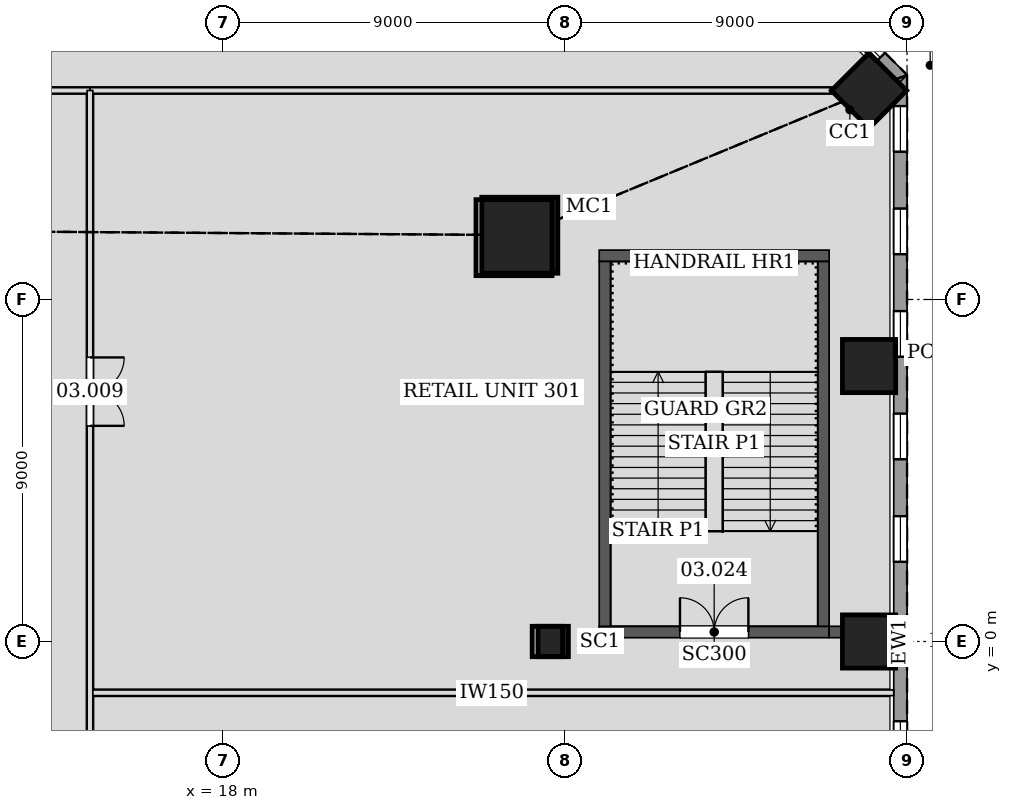
"""IFC4 building model, lengths in metres.
Left out: names, types, materials, properties, quantities, classifications, styles, units other than length and angle.
Written with IfcOpenShell. Run it as: python <this file> out.ifc"""

import sys

from ifc_helpers import new_model, si_unit, direction, frame, frame_2d, origin, origin_2d, place, context, subcontext, project, spatial, rectangle, hollow_rectangle, extrude, element, fill, save


model = new_model("IFC4")
c1 = context("Model", 3, precision=1e-05, world=origin(), true_north=direction((0.0, 1.0)))
c2 = subcontext(c1, "Body", "Model", "MODEL_VIEW")
j1 = project(units=[si_unit("LENGTHUNIT", "METRE"), si_unit("PLANEANGLEUNIT", "RADIAN")], contexts=[c1])
p1 = place(None, origin())
s1 = spatial("IfcSite", under=j1, at=p1, CompositionType="ELEMENT")
p2 = place(p1, origin())
s2 = spatial("IfcBuilding", under=s1, at=p2, CompositionType="ELEMENT")
p3 = place(p2, frame((0.0, 0.0, 18.6)))
s3 = spatial("IfcBuildingStorey", under=s2, at=p3, CompositionType="ELEMENT", Elevation=18.6)
p4 = place(p3, frame((25.81, 10.691, 0.0), z_axis=(-0.028289472832, -0.011704430453, 0.999531246152), x_axis=(0.3823083337, -0.92403481427, 0.0)))
e1 = element("IfcColumn", 1, at=p4, inside=s3, PredefinedType="COLUMN", context=c2, shape_type="SweptSolid", body=[
    extrude(hollow_rectangle(XDim=2.0, YDim=2.0, WallThickness=0.09, at=origin_2d()), origin(), (0.0, 0.0, 1.0), 5.402),
])
p5 = place(p3, frame((26.688, 0.0, 0.0), z_axis=(-0.02824625291, 0.0, 0.999600994996), x_axis=(0.0, -1.0, 0.0)))
e2 = element("IfcColumn", 2, at=p5, inside=s3, PredefinedType="COLUMN", context=c2, shape_type="SweptSolid", body=[
    extrude(hollow_rectangle(XDim=0.8, YDim=0.8, WallThickness=0.05, at=origin_2d()), origin(), (0.0, 0.0, 1.0), 5.402),
])
for number, where, z_axis, x_axis in (
    (3, (35.0, 0.0, 0.0), (0.0, 0.0, 1.0), (1.0, 0.0, 0.0)),
    (4, (35.0, 7.249, 0.0), (0.0, 0.0, 1.0), (1.0, 0.0, 0.0)),
    (5, (35.0, 14.498, 0.0), (0.0, 0.0, 1.0), (0.707, 0.707, 0.0)),
):
    element("IfcColumn", number, at=place(p3, frame(where, z_axis=z_axis, x_axis=x_axis)), inside=s3, PredefinedType="COLUMN", context=c2, shape_type="SweptSolid", body=[
        extrude(rectangle(XDim=1.4, YDim=1.4, at=origin_2d()), origin(), (0.0, 0.0, 1.0), 5.4),
    ])
p6 = place(p3, frame((27.9, 0.25, 0.0), z_axis=(0.0, 0.0, 1.0), x_axis=(1.0, 0.0, 0.0)))
e6 = element("IfcWall", 6, at=p6, inside=s3, PredefinedType="SOLIDWALL", context=c2, shape_type="SweptSolid", body=[
    extrude(rectangle(XDim=6.05, YDim=0.3, at=frame_2d((3.025, 0.0))), origin(), (0.0, 0.0, 1.0), 5.4),
])
p7 = place(p6, frame((2.125, 0.0, 0.0)))
e7 = element("IfcOpeningElement", 7, at=p7, cuts=e6, PredefinedType="OPENING", context=c2, shape_type="SweptSolid", body=[
    extrude(rectangle(XDim=1.8, YDim=2.1, at=frame_2d((0.9, 1.05))), frame((0.0, 0.16, 0.0), z_axis=(0.0, -1.0, 0.0), x_axis=(1.0, 0.0, 0.0)), (0.0, 0.0, 1.0), 0.32),
])
p8 = place(p3, frame((33.95, 0.25, 0.0), z_axis=(0.0, 0.0, 1.0), x_axis=(1.0, 0.0, 0.0)))
e8 = element("IfcWall", 8, at=p8, inside=s3, PredefinedType="SOLIDWALL", context=c2, shape_type="SweptSolid", body=[
    extrude(rectangle(XDim=0.35, YDim=0.3, at=frame_2d((0.175, 0.0))), origin(), (0.0, 0.0, 1.0), 4.744),
])
p9 = place(p3, frame((33.95, 10.15, 0.0), z_axis=(0.0, 0.0, 1.0), x_axis=(-1.0, 0.0, 0.0)))
e9 = element("IfcWall", 9, at=p9, inside=s3, PredefinedType="SOLIDWALL", context=c2, shape_type="SweptSolid", body=[
    extrude(rectangle(XDim=6.05, YDim=0.3, at=frame_2d((3.025, 0.0))), origin(), (0.0, 0.0, 1.0), 5.4),
])
for number, where, z_axis, x_axis in (
    (10, (28.05, 10.0, 0.0), (0.0, 0.0, 1.0), (0.0, -1.0, 0.0)),
    (11, (33.8, 0.4, 0.0), (0.0, 0.0, 1.0), (0.0, 1.0, 0.0)),
):
    element("IfcWall", number, at=place(p3, frame(where, z_axis=z_axis, x_axis=x_axis)), inside=s3, PredefinedType="SOLIDWALL", context=c2, shape_type="SweptSolid", body=[
        extrude(rectangle(XDim=9.6, YDim=0.3, at=frame_2d((4.8, 0.0))), origin(), (0.0, 0.0, 1.0), 5.4),
    ])
p10 = place(p3, frame((35.825, -14.912, 0.0), z_axis=(0.0, 0.0, 1.0), x_axis=(0.0, 1.0, 0.0)))
e12 = element("IfcWall", 12, at=p10, inside=s3, PredefinedType="SOLIDWALL", context=c2, shape_type="SweptSolid", body=[
    extrude(rectangle(XDim=29.823, YDim=0.35, at=frame_2d((14.912, 0.0))), origin(), (0.0, 0.0, 1.0), 5.1),
])
p11 = place(p10, frame((0.822, 0.0, 0.9)))
e13 = element("IfcOpeningElement", 13, at=p11, cuts=e12, PredefinedType="OPENING", context=c2, shape_type="SweptSolid", body=[
    extrude(rectangle(XDim=1.2, YDim=3.6, at=frame_2d((0.6, 1.8))), frame((0.0, 0.185, 0.0), z_axis=(0.0, -1.0, 0.0), x_axis=(1.0, 0.0, 0.0)), (0.0, 0.0, 1.0), 0.37),
])
p12 = place(p10, frame((3.52, 0.0, 0.9)))
e14 = element("IfcOpeningElement", 14, at=p12, cuts=e12, PredefinedType="OPENING", context=c2, shape_type="SweptSolid", body=[
    extrude(rectangle(XDim=1.2, YDim=3.6, at=frame_2d((0.6, 1.8))), frame((0.0, 0.185, 0.0), z_axis=(0.0, -1.0, 0.0), x_axis=(1.0, 0.0, 0.0)), (0.0, 0.0, 1.0), 0.37),
])
p13 = place(p10, frame((6.218, 0.0, 0.9)))
e15 = element("IfcOpeningElement", 15, at=p13, cuts=e12, PredefinedType="OPENING", context=c2, shape_type="SweptSolid", body=[
    extrude(rectangle(XDim=1.2, YDim=3.6, at=frame_2d((0.6, 1.8))), frame((0.0, 0.185, 0.0), z_axis=(0.0, -1.0, 0.0), x_axis=(1.0, 0.0, 0.0)), (0.0, 0.0, 1.0), 0.37),
])
p14 = place(p10, frame((8.916, 0.0, 0.9)))
e16 = element("IfcOpeningElement", 16, at=p14, cuts=e12, PredefinedType="OPENING", context=c2, shape_type="SweptSolid", body=[
    extrude(rectangle(XDim=1.2, YDim=3.6, at=frame_2d((0.6, 1.8))), frame((0.0, 0.185, 0.0), z_axis=(0.0, -1.0, 0.0), x_axis=(1.0, 0.0, 0.0)), (0.0, 0.0, 1.0), 0.37),
])
p15 = place(p10, frame((11.614, 0.0, 0.9)))
e17 = element("IfcOpeningElement", 17, at=p15, cuts=e12, PredefinedType="OPENING", context=c2, shape_type="SweptSolid", body=[
    extrude(rectangle(XDim=1.2, YDim=3.6, at=frame_2d((0.6, 1.8))), frame((0.0, 0.185, 0.0), z_axis=(0.0, -1.0, 0.0), x_axis=(1.0, 0.0, 0.0)), (0.0, 0.0, 1.0), 0.37),
])
p16 = place(p10, frame((14.312, 0.0, 0.9)))
e18 = element("IfcOpeningElement", 18, at=p16, cuts=e12, PredefinedType="OPENING", context=c2, shape_type="SweptSolid", body=[
    extrude(rectangle(XDim=1.2, YDim=3.6, at=frame_2d((0.6, 1.8))), frame((0.0, 0.185, 0.0), z_axis=(0.0, -1.0, 0.0), x_axis=(1.0, 0.0, 0.0)), (0.0, 0.0, 1.0), 0.37),
])
p17 = place(p10, frame((17.01, 0.0, 0.9)))
e19 = element("IfcOpeningElement", 19, at=p17, cuts=e12, PredefinedType="OPENING", context=c2, shape_type="SweptSolid", body=[
    extrude(rectangle(XDim=1.2, YDim=3.6, at=frame_2d((0.6, 1.8))), frame((0.0, 0.185, 0.0), z_axis=(0.0, -1.0, 0.0), x_axis=(1.0, 0.0, 0.0)), (0.0, 0.0, 1.0), 0.37),
])
p18 = place(p10, frame((19.708, 0.0, 0.9)))
e20 = element("IfcOpeningElement", 20, at=p18, cuts=e12, PredefinedType="OPENING", context=c2, shape_type="SweptSolid", body=[
    extrude(rectangle(XDim=1.2, YDim=3.6, at=frame_2d((0.6, 1.8))), frame((0.0, 0.185, 0.0), z_axis=(0.0, -1.0, 0.0), x_axis=(1.0, 0.0, 0.0)), (0.0, 0.0, 1.0), 0.37),
])
p19 = place(p10, frame((22.406, 0.0, 0.9)))
e21 = element("IfcOpeningElement", 21, at=p19, cuts=e12, PredefinedType="OPENING", context=c2, shape_type="SweptSolid", body=[
    extrude(rectangle(XDim=1.2, YDim=3.6, at=frame_2d((0.6, 1.8))), frame((0.0, 0.185, 0.0), z_axis=(0.0, -1.0, 0.0), x_axis=(1.0, 0.0, 0.0)), (0.0, 0.0, 1.0), 0.37),
])
p20 = place(p10, frame((25.104, 0.0, 0.9)))
e22 = element("IfcOpeningElement", 22, at=p20, cuts=e12, PredefinedType="OPENING", context=c2, shape_type="SweptSolid", body=[
    extrude(rectangle(XDim=1.2, YDim=3.6, at=frame_2d((0.6, 1.8))), frame((0.0, 0.185, 0.0), z_axis=(0.0, -1.0, 0.0), x_axis=(1.0, 0.0, 0.0)), (0.0, 0.0, 1.0), 0.37),
])
p21 = place(p10, frame((27.802, 0.0, 0.9)))
e23 = element("IfcOpeningElement", 23, at=p21, cuts=e12, PredefinedType="OPENING", context=c2, shape_type="SweptSolid", body=[
    extrude(rectangle(XDim=1.2, YDim=3.6, at=frame_2d((0.6, 1.8))), frame((0.0, 0.185, 0.0), z_axis=(0.0, -1.0, 0.0), x_axis=(1.0, 0.0, 0.0)), (0.0, 0.0, 1.0), 0.37),
])
p22 = place(p3, frame((35.876, 14.788, 0.0), z_axis=(0.0, 0.0, 1.0), x_axis=(-0.707106781187, 0.707106781187, 0.0)))
e24 = element("IfcWall", 24, at=p22, inside=s3, PredefinedType="SOLIDWALL", context=c2, shape_type="SweptSolid", body=[
    extrude(rectangle(XDim=29.823, YDim=0.35, at=frame_2d((14.912, 0.0))), origin(), (0.0, 0.0, 1.0), 5.1),
])
p23 = place(p22, frame((0.822, 0.0, 0.9)))
e25 = element("IfcOpeningElement", 25, at=p23, cuts=e24, PredefinedType="OPENING", context=c2, shape_type="SweptSolid", body=[
    extrude(rectangle(XDim=1.2, YDim=3.6, at=frame_2d((0.6, 1.8))), frame((0.0, 0.185, 0.0), z_axis=(0.0, -1.0, 0.0), x_axis=(1.0, 0.0, 0.0)), (0.0, 0.0, 1.0), 0.37),
])
p24 = place(p22, frame((3.52, 0.0, 0.9)))
e26 = element("IfcOpeningElement", 26, at=p24, cuts=e24, PredefinedType="OPENING", context=c2, shape_type="SweptSolid", body=[
    extrude(rectangle(XDim=1.2, YDim=3.6, at=frame_2d((0.6, 1.8))), frame((0.0, 0.185, 0.0), z_axis=(0.0, -1.0, 0.0), x_axis=(1.0, 0.0, 0.0)), (0.0, 0.0, 1.0), 0.37),
])
p25 = place(p22, frame((6.218, 0.0, 0.9)))
e27 = element("IfcOpeningElement", 27, at=p25, cuts=e24, PredefinedType="OPENING", context=c2, shape_type="SweptSolid", body=[
    extrude(rectangle(XDim=1.2, YDim=3.6, at=frame_2d((0.6, 1.8))), frame((0.0, 0.185, 0.0), z_axis=(0.0, -1.0, 0.0), x_axis=(1.0, 0.0, 0.0)), (0.0, 0.0, 1.0), 0.37),
])
p26 = place(p22, frame((8.916, 0.0, 0.9)))
e28 = element("IfcOpeningElement", 28, at=p26, cuts=e24, PredefinedType="OPENING", context=c2, shape_type="SweptSolid", body=[
    extrude(rectangle(XDim=1.2, YDim=3.6, at=frame_2d((0.6, 1.8))), frame((0.0, 0.185, 0.0), z_axis=(0.0, -1.0, 0.0), x_axis=(1.0, 0.0, 0.0)), (0.0, 0.0, 1.0), 0.37),
])
p27 = place(p22, frame((11.614, 0.0, 0.9)))
e29 = element("IfcOpeningElement", 29, at=p27, cuts=e24, PredefinedType="OPENING", context=c2, shape_type="SweptSolid", body=[
    extrude(rectangle(XDim=1.2, YDim=3.6, at=frame_2d((0.6, 1.8))), frame((0.0, 0.185, 0.0), z_axis=(0.0, -1.0, 0.0), x_axis=(1.0, 0.0, 0.0)), (0.0, 0.0, 1.0), 0.37),
])
p28 = place(p22, frame((14.312, 0.0, 0.9)))
e30 = element("IfcOpeningElement", 30, at=p28, cuts=e24, PredefinedType="OPENING", context=c2, shape_type="SweptSolid", body=[
    extrude(rectangle(XDim=1.2, YDim=3.6, at=frame_2d((0.6, 1.8))), frame((0.0, 0.185, 0.0), z_axis=(0.0, -1.0, 0.0), x_axis=(1.0, 0.0, 0.0)), (0.0, 0.0, 1.0), 0.37),
])
p29 = place(p22, frame((17.01, 0.0, 0.9)))
e31 = element("IfcOpeningElement", 31, at=p29, cuts=e24, PredefinedType="OPENING", context=c2, shape_type="SweptSolid", body=[
    extrude(rectangle(XDim=1.2, YDim=3.6, at=frame_2d((0.6, 1.8))), frame((0.0, 0.185, 0.0), z_axis=(0.0, -1.0, 0.0), x_axis=(1.0, 0.0, 0.0)), (0.0, 0.0, 1.0), 0.37),
])
p30 = place(p22, frame((19.708, 0.0, 0.9)))
e32 = element("IfcOpeningElement", 32, at=p30, cuts=e24, PredefinedType="OPENING", context=c2, shape_type="SweptSolid", body=[
    extrude(rectangle(XDim=1.2, YDim=3.6, at=frame_2d((0.6, 1.8))), frame((0.0, 0.185, 0.0), z_axis=(0.0, -1.0, 0.0), x_axis=(1.0, 0.0, 0.0)), (0.0, 0.0, 1.0), 0.37),
])
p31 = place(p22, frame((22.406, 0.0, 0.9)))
e33 = element("IfcOpeningElement", 33, at=p31, cuts=e24, PredefinedType="OPENING", context=c2, shape_type="SweptSolid", body=[
    extrude(rectangle(XDim=1.2, YDim=3.6, at=frame_2d((0.6, 1.8))), frame((0.0, 0.185, 0.0), z_axis=(0.0, -1.0, 0.0), x_axis=(1.0, 0.0, 0.0)), (0.0, 0.0, 1.0), 0.37),
])
p32 = place(p22, frame((25.104, 0.0, 0.9)))
e34 = element("IfcOpeningElement", 34, at=p32, cuts=e24, PredefinedType="OPENING", context=c2, shape_type="SweptSolid", body=[
    extrude(rectangle(XDim=1.2, YDim=3.6, at=frame_2d((0.6, 1.8))), frame((0.0, 0.185, 0.0), z_axis=(0.0, -1.0, 0.0), x_axis=(1.0, 0.0, 0.0)), (0.0, 0.0, 1.0), 0.37),
])
p33 = place(p22, frame((27.802, 0.0, 0.9)))
e35 = element("IfcOpeningElement", 35, at=p33, cuts=e24, PredefinedType="OPENING", context=c2, shape_type="SweptSolid", body=[
    extrude(rectangle(XDim=1.2, YDim=3.6, at=frame_2d((0.6, 1.8))), frame((0.0, 0.185, 0.0), z_axis=(0.0, -1.0, 0.0), x_axis=(1.0, 0.0, 0.0)), (0.0, 0.0, 1.0), 0.37),
])
p34 = place(p3, frame((14.499, 14.5, 0.0), z_axis=(0.0, 0.0, 1.0), x_axis=(1.0, 0.0, 0.0)))
e36 = element("IfcWall", 36, at=p34, inside=s3, PredefinedType="PARTITIONING", context=c2, shape_type="SweptSolid", body=[
    extrude(rectangle(XDim=19.487, YDim=0.15, at=frame_2d((9.743, 0.0))), origin(), (0.0, 0.0, 1.0), 4.13),
])
p35 = place(p3, frame((-14.501, 14.5, 0.0), z_axis=(0.0, 0.0, 1.0), x_axis=(1.0, 0.0, 0.0)))
e37 = element("IfcWall", 37, at=p35, inside=s3, PredefinedType="PARTITIONING", context=c2, shape_type="SweptSolid", body=[
    extrude(rectangle(XDim=29.002, YDim=0.15, at=frame_2d((14.501, 0.0))), origin(), (0.0, 0.0, 1.0), 3.79),
])
p36 = place(p35, frame((6.351, 0.0, 0.0)))
e38 = element("IfcOpeningElement", 38, at=p36, cuts=e37, PredefinedType="OPENING", context=c2, shape_type="SweptSolid", body=[
    extrude(rectangle(XDim=1.8, YDim=2.4, at=frame_2d((0.9, 1.2))), frame((0.0, 0.085, 0.0), z_axis=(0.0, -1.0, 0.0), x_axis=(1.0, 0.0, 0.0)), (0.0, 0.0, 1.0), 0.17),
])
p37 = place(p35, frame((13.601, 0.0, 0.0)))
e39 = element("IfcOpeningElement", 39, at=p37, cuts=e37, PredefinedType="OPENING", context=c2, shape_type="SweptSolid", body=[
    extrude(rectangle(XDim=1.8, YDim=2.4, at=frame_2d((0.9, 1.2))), frame((0.0, 0.085, 0.0), z_axis=(0.0, -1.0, 0.0), x_axis=(1.0, 0.0, 0.0)), (0.0, 0.0, 1.0), 0.17),
])
p38 = place(p35, frame((20.852, 0.0, 0.0)))
e40 = element("IfcOpeningElement", 40, at=p38, cuts=e37, PredefinedType="OPENING", context=c2, shape_type="SweptSolid", body=[
    extrude(rectangle(XDim=1.8, YDim=2.4, at=frame_2d((0.9, 1.2))), frame((0.0, 0.085, 0.0), z_axis=(0.0, -1.0, 0.0), x_axis=(1.0, 0.0, 0.0)), (0.0, 0.0, 1.0), 0.17),
])
p39 = place(p3, frame((14.5, -1.35, 0.0), z_axis=(0.0, 0.0, 1.0), x_axis=(1.0, 0.0, 0.0)))
e41 = element("IfcWall", 41, at=p39, inside=s3, PredefinedType="PARTITIONING", context=c2, shape_type="SweptSolid", body=[
    extrude(rectangle(XDim=21.15, YDim=0.15, at=frame_2d((10.575, 0.0))), origin(), (0.0, 0.0, 1.0), 4.163),
])
p40 = place(p3, frame((14.5, 14.5, 0.0), z_axis=(0.0, 0.0, 1.0), x_axis=(0.0, -1.0, 0.0)))
e42 = element("IfcWall", 42, at=p40, inside=s3, PredefinedType="PARTITIONING", context=c2, shape_type="SweptSolid", body=[
    extrude(rectangle(XDim=29.0, YDim=0.15, at=frame_2d((14.5, 0.0))), origin(), (0.0, 0.0, 1.0), 3.79),
])
p41 = place(p40, frame((7.025, 0.0, 0.0)))
e43 = element("IfcOpeningElement", 43, at=p41, cuts=e42, PredefinedType="OPENING", context=c2, shape_type="SweptSolid", body=[
    extrude(rectangle(XDim=1.8, YDim=2.4, at=frame_2d((0.9, 1.2))), frame((0.0, 0.085, 0.0), z_axis=(0.0, -1.0, 0.0), x_axis=(1.0, 0.0, 0.0)), (0.0, 0.0, 1.0), 0.17),
])
p42 = place(p15, origin())
e44 = element("IfcWindow", 44, at=p42, inside=s3, PartitioningType="SINGLE_PANEL", PredefinedType="WINDOW", context=c2, shape_type="SweptSolid", body=[
    extrude(rectangle(XDim=1.2, YDim=3.6, at=frame_2d((0.6, 1.8))), frame((0.0, 0.03, 0.0), z_axis=(0.0, -1.0, 0.0), x_axis=(1.0, 0.0, 0.0)), (0.0, 0.0, 1.0), 0.06),
])
fill(e17, e44)
p43 = place(p16, origin())
e45 = element("IfcWindow", 45, at=p43, inside=s3, PartitioningType="SINGLE_PANEL", PredefinedType="WINDOW", context=c2, shape_type="SweptSolid", body=[
    extrude(rectangle(XDim=1.2, YDim=3.6, at=frame_2d((0.6, 1.8))), frame((0.0, 0.03, 0.0), z_axis=(0.0, -1.0, 0.0), x_axis=(1.0, 0.0, 0.0)), (0.0, 0.0, 1.0), 0.06),
])
fill(e18, e45)
p44 = place(p17, origin())
e46 = element("IfcWindow", 46, at=p44, inside=s3, PartitioningType="SINGLE_PANEL", PredefinedType="WINDOW", context=c2, shape_type="SweptSolid", body=[
    extrude(rectangle(XDim=1.2, YDim=3.6, at=frame_2d((0.6, 1.8))), frame((0.0, 0.03, 0.0), z_axis=(0.0, -1.0, 0.0), x_axis=(1.0, 0.0, 0.0)), (0.0, 0.0, 1.0), 0.06),
])
fill(e19, e46)
p45 = place(p18, origin())
e47 = element("IfcWindow", 47, at=p45, inside=s3, PartitioningType="SINGLE_PANEL", PredefinedType="WINDOW", context=c2, shape_type="SweptSolid", body=[
    extrude(rectangle(XDim=1.2, YDim=3.6, at=frame_2d((0.6, 1.8))), frame((0.0, 0.03, 0.0), z_axis=(0.0, -1.0, 0.0), x_axis=(1.0, 0.0, 0.0)), (0.0, 0.0, 1.0), 0.06),
])
fill(e20, e47)
p46 = place(p19, origin())
e48 = element("IfcWindow", 48, at=p46, inside=s3, PartitioningType="SINGLE_PANEL", PredefinedType="WINDOW", context=c2, shape_type="SweptSolid", body=[
    extrude(rectangle(XDim=1.2, YDim=3.6, at=frame_2d((0.6, 1.8))), frame((0.0, 0.03, 0.0), z_axis=(0.0, -1.0, 0.0), x_axis=(1.0, 0.0, 0.0)), (0.0, 0.0, 1.0), 0.06),
])
fill(e21, e48)
p47 = place(p20, origin())
e49 = element("IfcWindow", 49, at=p47, inside=s3, PartitioningType="SINGLE_PANEL", PredefinedType="WINDOW", context=c2, shape_type="SweptSolid", body=[
    extrude(rectangle(XDim=1.2, YDim=3.6, at=frame_2d((0.6, 1.8))), frame((0.0, 0.03, 0.0), z_axis=(0.0, -1.0, 0.0), x_axis=(1.0, 0.0, 0.0)), (0.0, 0.0, 1.0), 0.06),
])
fill(e22, e49)
p48 = place(p21, origin())
e50 = element("IfcWindow", 50, at=p48, inside=s3, PartitioningType="SINGLE_PANEL", PredefinedType="WINDOW", context=c2, shape_type="SweptSolid", body=[
    extrude(rectangle(XDim=1.2, YDim=3.6, at=frame_2d((0.6, 1.8))), frame((0.0, 0.03, 0.0), z_axis=(0.0, -1.0, 0.0), x_axis=(1.0, 0.0, 0.0)), (0.0, 0.0, 1.0), 0.06),
])
fill(e23, e50)
p49 = place(p23, origin())
e51 = element("IfcWindow", 51, at=p49, inside=s3, PartitioningType="SINGLE_PANEL", PredefinedType="WINDOW", context=c2, shape_type="SweptSolid", body=[
    extrude(rectangle(XDim=1.2, YDim=3.6, at=frame_2d((0.6, 1.8))), frame((0.0, 0.03, 0.0), z_axis=(0.0, -1.0, 0.0), x_axis=(1.0, 0.0, 0.0)), (0.0, 0.0, 1.0), 0.06),
])
fill(e25, e51)
p50 = place(p41, origin())
e52 = element("IfcDoor", 52, at=p50, inside=s3, OperationType="DOUBLE_DOOR_SINGLE_SWING", PredefinedType="DOOR", context=c2, shape_type="SweptSolid", body=[
    extrude(rectangle(XDim=1.8, YDim=2.4, at=frame_2d((0.9, 1.2))), frame((0.0, 0.025, 0.0), z_axis=(0.0, -1.0, 0.0), x_axis=(1.0, 0.0, 0.0)), (0.0, 0.0, 1.0), 0.05),
])
fill(e43, e52)
p51 = place(p7, origin())
e53 = element("IfcDoor", 53, at=p51, inside=s3, OperationType="DOUBLE_DOOR_SINGLE_SWING", PredefinedType="DOOR", context=c2, shape_type="SweptSolid", body=[
    extrude(rectangle(XDim=1.8, YDim=2.1, at=frame_2d((0.9, 1.05))), frame((0.0, 0.025, 0.0), z_axis=(0.0, -1.0, 0.0), x_axis=(1.0, 0.0, 0.0)), (0.0, 0.0, 1.0), 0.05),
])
fill(e7, e53)
save(model, sys.argv[1])
